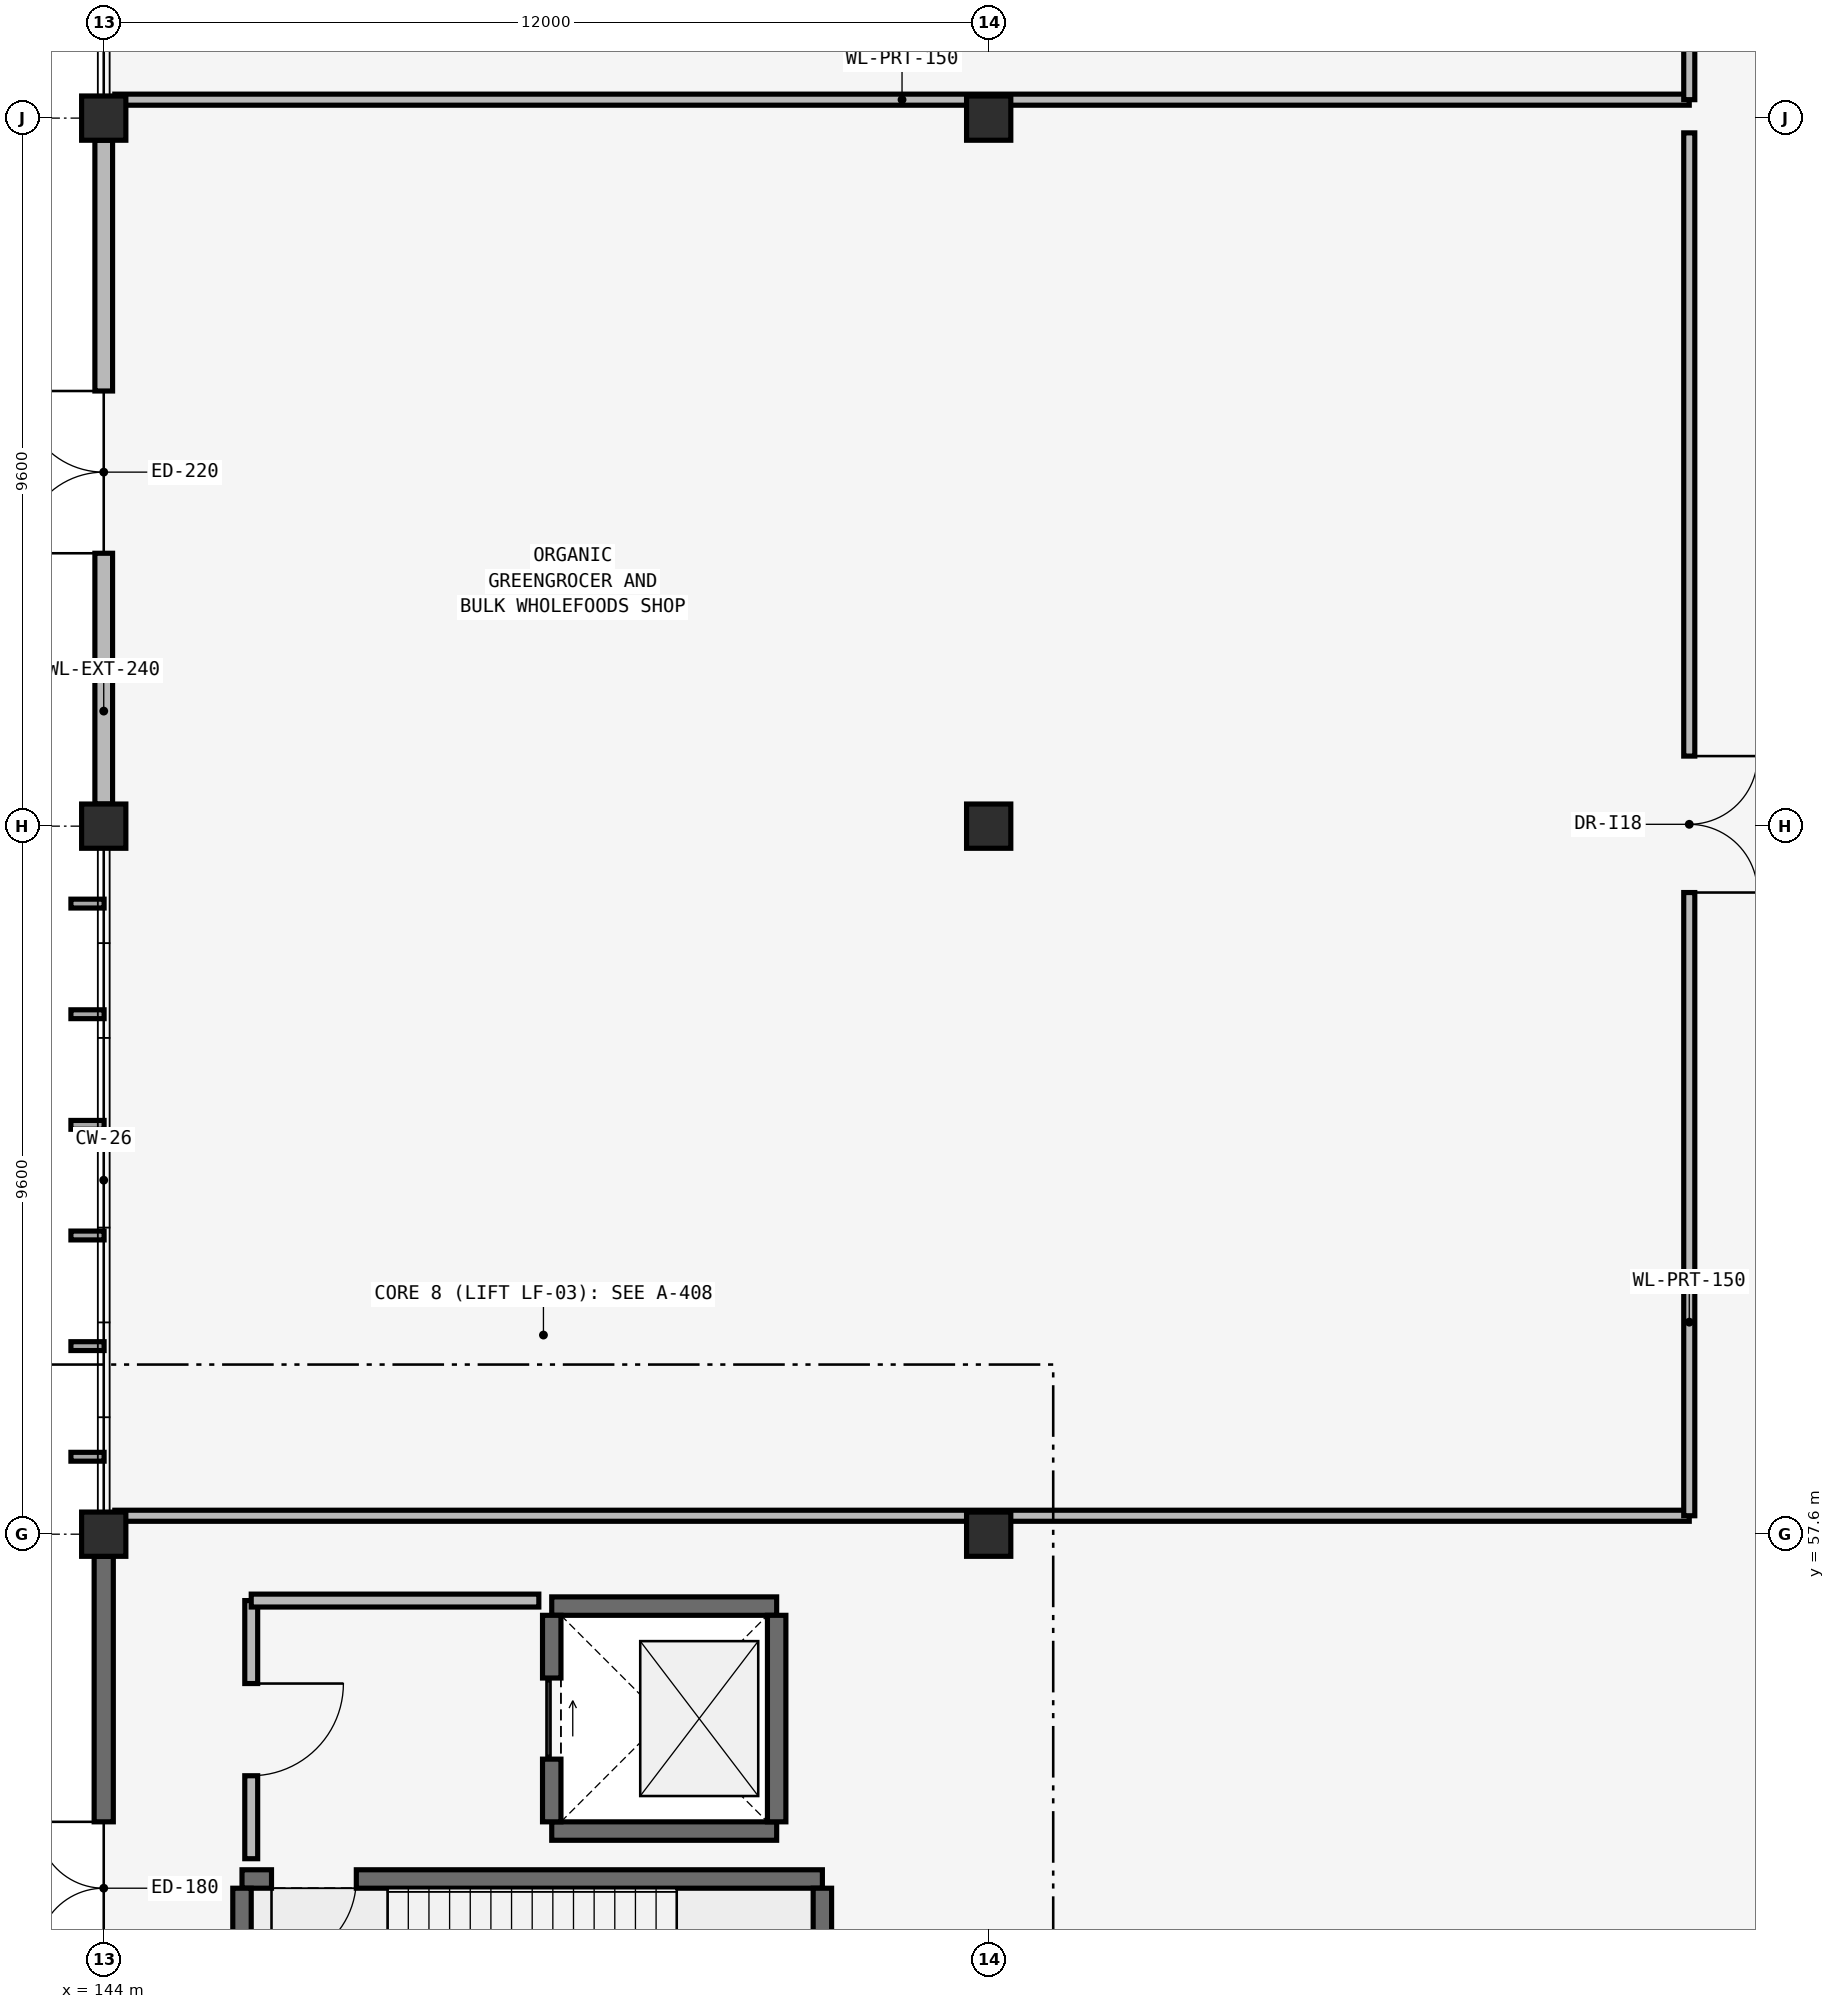
"""IFC4 building model, lengths in metres.
Left out: names, types, materials, properties, quantities, classifications, styles, units other than length and angle.
Written with IfcOpenShell. Run it as: python <this file> out.ifc"""

import sys

from ifc_helpers import new_model, si_unit, direction, frame, frame_2d, origin, origin_2d, place, context, subcontext, project, spatial, rectangle, extrude, element, fill, save


model = new_model("IFC4")
c1 = context("Model", 3, precision=1e-05, world=origin(), true_north=direction((0.0, 1.0)))
c2 = subcontext(c1, "Body", "Model", "MODEL_VIEW")
j1 = project(units=[si_unit("LENGTHUNIT", "METRE"), si_unit("PLANEANGLEUNIT", "RADIAN")], contexts=[c1])
p1 = place(None, origin())
s1 = spatial("IfcSite", under=j1, at=p1, CompositionType="ELEMENT")
p2 = place(p1, origin())
s2 = spatial("IfcBuilding", under=s1, at=p2, CompositionType="ELEMENT")
p3 = place(p2, origin())
s3 = spatial("IfcBuildingStorey", under=s2, at=p3, CompositionType="ELEMENT", Elevation=0.0)
for number, where, z_axis, x_axis in (
    (1, (144.0, 57.6, 0.0), (0.0, 0.0, 1.0), (1.0, 0.0, 0.0)),
    (2, (144.0, 67.2, 0.0), (0.0, 0.0, 1.0), (1.0, 0.0, 0.0)),
    (3, (144.0, 76.8, 0.0), (0.0, 0.0, 1.0), (1.0, 0.0, 0.0)),
    (4, (156.0, 57.6, 0.0), (0.0, 0.0, 1.0), (1.0, 0.0, 0.0)),
    (5, (156.0, 67.2, 0.0), (0.0, 0.0, 1.0), (1.0, 0.0, 0.0)),
    (6, (156.0, 76.8, 0.0), (0.0, 0.0, 1.0), (1.0, 0.0, 0.0)),
):
    element("IfcColumn", number, at=place(p3, frame(where, z_axis=z_axis, x_axis=x_axis)), inside=s3, PredefinedType="COLUMN", context=c2, shape_type="SweptSolid", body=[
        extrude(rectangle(XDim=0.6, YDim=0.6, at=origin_2d()), origin(), (0.0, 0.0, 1.0), 5.4),
    ])
p4 = place(p3, frame((144.0, 48.3, 0.0), z_axis=(0.0, 0.0, 1.0), x_axis=(0.0, 1.0, 0.0)))
e7 = element("IfcWall", 7, at=p4, inside=s3, PredefinedType="SOLIDWALL", context=c2, shape_type="SweptSolid", body=[
    extrude(rectangle(XDim=9.0, YDim=0.26, at=frame_2d((4.5, 0.0))), origin(), (0.0, 0.0, 1.0), 5.1),
])
p5 = place(p4, frame((3.6, 0.0, 0.0)))
e8 = element("IfcOpeningElement", 8, at=p5, cuts=e7, PredefinedType="OPENING", context=c2, shape_type="SweptSolid", body=[
    extrude(rectangle(XDim=1.8, YDim=2.3, at=frame_2d((0.9, 1.15))), frame((0.0, 0.145, 0.0), z_axis=(0.0, -1.0, 0.0), x_axis=(1.0, 0.0, 0.0)), (0.0, 0.0, 1.0), 0.29),
])
p6 = place(p3, frame((144.0, 67.5, 0.0), z_axis=(0.0, 0.0, 1.0), x_axis=(0.0, 1.0, 0.0)))
e9 = element("IfcWall", 9, at=p6, inside=s3, PredefinedType="SOLIDWALL", context=c2, shape_type="SweptSolid", body=[
    extrude(rectangle(XDim=9.0, YDim=0.24, at=frame_2d((4.5, 0.0))), origin(), (0.0, 0.0, 1.0), 4.321),
])
p7 = place(p6, frame((3.4, 0.0, 0.0)))
e10 = element("IfcOpeningElement", 10, at=p7, cuts=e9, PredefinedType="OPENING", context=c2, shape_type="SweptSolid", body=[
    extrude(rectangle(XDim=2.2, YDim=2.4, at=frame_2d((1.1, 1.2))), frame((0.0, 0.135, 0.0), z_axis=(0.0, -1.0, 0.0), x_axis=(1.0, 0.0, 0.0)), (0.0, 0.0, 1.0), 0.27),
])
p8 = place(p3, frame((145.875, 52.925, 0.0), z_axis=(0.0, 0.0, 1.0), x_axis=(1.0, 0.0, 0.0)))
e11 = element("IfcWall", 11, at=p8, inside=s3, PredefinedType="SHEAR", context=c2, shape_type="SweptSolid", body=[
    extrude(rectangle(XDim=7.87, YDim=0.25, at=frame_2d((3.935, 0.0))), origin(), (0.0, 0.0, 1.0), 5.08),
])
p9 = place(p8, frame((0.4, 0.0, 0.0)))
e12 = element("IfcOpeningElement", 12, at=p9, cuts=e11, PredefinedType="OPENING", context=c2, shape_type="SweptSolid", body=[
    extrude(rectangle(XDim=1.15, YDim=2.15, at=frame_2d((0.575, 1.075))), frame((0.0, 0.14, 0.0), z_axis=(0.0, -1.0, 0.0), x_axis=(1.0, 0.0, 0.0)), (0.0, 0.0, 1.0), 0.28),
])
for number, where, z_axis, x_axis in (
    (13, (145.875, 48.9, 0.0), (0.0, 0.0, 1.0), (0.0, 1.0, 0.0)),
    (14, (153.745, 48.9, 0.0), (0.0, 0.0, 1.0), (0.0, 1.0, 0.0)),
):
    element("IfcWall", number, at=place(p3, frame(where, z_axis=z_axis, x_axis=x_axis)), inside=s3, PredefinedType="SHEAR", context=c2, shape_type="SweptSolid", body=[
        extrude(rectangle(XDim=3.9, YDim=0.25, at=frame_2d((1.95, 0.0))), origin(), (0.0, 0.0, 1.0), 5.08),
    ])
for number, where, z_axis, x_axis in (
    (15, (150.075, 53.575, 0.0), (0.0, 0.0, 1.0), (1.0, 0.0, 0.0)),
    (16, (150.075, 56.625, 0.0), (0.0, 0.0, 1.0), (1.0, 0.0, 0.0)),
):
    element("IfcWall", number, at=place(p3, frame(where, z_axis=z_axis, x_axis=x_axis)), inside=s3, PredefinedType="SHEAR", context=c2, shape_type="SweptSolid", body=[
        extrude(rectangle(XDim=3.05, YDim=0.25, at=frame_2d((1.525, 0.0))), origin(), (0.0, 0.0, 1.0), 5.08),
    ])
p10 = place(p3, frame((153.125, 53.7, 0.0), z_axis=(0.0, 0.0, 1.0), x_axis=(0.0, 1.0, 0.0)))
e17 = element("IfcWall", 17, at=p10, inside=s3, PredefinedType="SHEAR", context=c2, shape_type="SweptSolid", body=[
    extrude(rectangle(XDim=2.8, YDim=0.25, at=frame_2d((1.4, 0.0))), origin(), (0.0, 0.0, 1.0), 5.08),
])
p11 = place(p3, frame((150.075, 53.7, 0.0), z_axis=(0.0, 0.0, 1.0), x_axis=(0.0, 1.0, 0.0)))
e18 = element("IfcWall", 18, at=p11, inside=s3, PredefinedType="SHEAR", context=c2, shape_type="SweptSolid", body=[
    extrude(rectangle(XDim=2.8, YDim=0.25, at=frame_2d((1.4, 0.0))), origin(), (0.0, 0.0, 1.0), 5.08),
])
p12 = place(p11, frame((0.85, 0.0, 0.0)))
e19 = element("IfcOpeningElement", 19, at=p12, cuts=e18, PredefinedType="OPENING", context=c2, shape_type="SweptSolid", body=[
    extrude(rectangle(XDim=1.1, YDim=2.15, at=frame_2d((0.55, 1.075))), frame((0.0, 0.14, 0.0), z_axis=(0.0, -1.0, 0.0), x_axis=(1.0, 0.0, 0.0)), (0.0, 0.0, 1.0), 0.28),
])
p13 = place(p3, frame((146.0, 53.2, 0.0), z_axis=(0.0, 0.0, 1.0), x_axis=(0.0, 1.0, 0.0)))
e20 = element("IfcWall", 20, at=p13, inside=s3, PredefinedType="PARTITIONING", context=c2, shape_type="SweptSolid", body=[
    extrude(rectangle(XDim=3.5, YDim=0.175, at=frame_2d((1.75, 0.0))), origin(), (0.0, 0.0, 1.0), 5.08),
])
p14 = place(p13, frame((1.125, 0.0, 0.0)))
e21 = element("IfcOpeningElement", 21, at=p14, cuts=e20, PredefinedType="OPENING", context=c2, shape_type="SweptSolid", body=[
    extrude(rectangle(XDim=1.25, YDim=2.2, at=frame_2d((0.625, 1.1))), frame((0.0, 0.103, 0.0), z_axis=(0.0, -1.0, 0.0), x_axis=(1.0, 0.0, 0.0)), (0.0, 0.0, 1.0), 0.205),
])
p15 = place(p3, frame((146.0, 56.7, 0.0), z_axis=(0.0, 0.0, 1.0), x_axis=(1.0, 0.0, 0.0)))
e22 = element("IfcWall", 22, at=p15, inside=s3, PredefinedType="PARTITIONING", context=c2, shape_type="SweptSolid", body=[
    extrude(rectangle(XDim=3.9, YDim=0.175, at=frame_2d((1.95, 0.0))), origin(), (0.0, 0.0, 1.0), 5.08),
])
p16 = place(p3, frame((144.15, 57.85, 0.0), z_axis=(0.0, 0.0, 1.0), x_axis=(1.0, 0.0, 0.0)))
e23 = element("IfcWall", 23, at=p16, inside=s3, PredefinedType="PARTITIONING", context=c2, shape_type="SweptSolid", body=[
    extrude(rectangle(XDim=21.35, YDim=0.15, at=frame_2d((10.675, 0.0))), origin(), (0.0, 0.0, 1.0), 5.08),
])
p17 = place(p3, frame((165.5, 57.85, 0.0), z_axis=(0.0, 0.0, 1.0), x_axis=(0.0, 1.0, 0.0)))
e24 = element("IfcWall", 24, at=p17, inside=s3, PredefinedType="PARTITIONING", context=c2, shape_type="SweptSolid", body=[
    extrude(rectangle(XDim=18.75, YDim=0.15, at=frame_2d((9.375, 0.0))), origin(), (0.0, 0.0, 1.0), 5.08),
])
p18 = place(p17, frame((8.45, 0.0, 0.0)))
e25 = element("IfcOpeningElement", 25, at=p18, cuts=e24, PredefinedType="OPENING", context=c2, shape_type="SweptSolid", body=[
    extrude(rectangle(XDim=1.85, YDim=2.2, at=frame_2d((0.925, 1.1))), frame((0.0, 0.09, 0.0), z_axis=(0.0, -1.0, 0.0), x_axis=(1.0, 0.0, 0.0)), (0.0, 0.0, 1.0), 0.18),
])
p19 = place(p3, frame((144.15, 77.05, 0.0), z_axis=(0.0, 0.0, 1.0), x_axis=(1.0, 0.0, 0.0)))
e26 = element("IfcWall", 26, at=p19, inside=s3, PredefinedType="PARTITIONING", context=c2, shape_type="SweptSolid", body=[
    extrude(rectangle(XDim=21.35, YDim=0.15, at=frame_2d((10.675, 0.0))), origin(), (0.0, 0.0, 1.0), 5.08),
])
p20 = place(p3, frame((165.5, 77.05, 0.0), z_axis=(0.0, 0.0, 1.0), x_axis=(0.0, 1.0, 0.0)))
e27 = element("IfcWall", 27, at=p20, inside=s3, PredefinedType="PARTITIONING", context=c2, shape_type="SweptSolid", body=[
    extrude(rectangle(XDim=18.8, YDim=0.15, at=frame_2d((9.4, 0.0))), origin(), (0.0, 0.0, 1.0), 5.08),
])
p21 = place(p20, frame((8.475, 0.0, 0.0)))
e28 = element("IfcOpeningElement", 28, at=p21, cuts=e27, PredefinedType="OPENING", context=c2, shape_type="SweptSolid", body=[
    extrude(rectangle(XDim=1.85, YDim=2.2, at=frame_2d((0.925, 1.1))), frame((0.0, 0.09, 0.0), z_axis=(0.0, -1.0, 0.0), x_axis=(1.0, 0.0, 0.0)), (0.0, 0.0, 1.0), 0.18),
])
p22 = place(p5, origin())
e29 = element("IfcDoor", 29, at=p22, inside=s3, OperationType="DOUBLE_DOOR_SINGLE_SWING", PredefinedType="DOOR", context=c2, shape_type="SweptSolid", body=[
    extrude(rectangle(XDim=1.8, YDim=2.3, at=frame_2d((0.9, 1.15))), frame((0.0, 0.025, 0.0), z_axis=(0.0, -1.0, 0.0), x_axis=(1.0, 0.0, 0.0)), (0.0, 0.0, 1.0), 0.05),
])
fill(e8, e29)
p23 = place(p7, origin())
e30 = element("IfcDoor", 30, at=p23, inside=s3, OperationType="DOUBLE_DOOR_SINGLE_SWING", PredefinedType="DOOR", context=c2, shape_type="SweptSolid", body=[
    extrude(rectangle(XDim=2.2, YDim=2.4, at=frame_2d((1.1, 1.2))), frame((0.0, 0.025, 0.0), z_axis=(0.0, -1.0, 0.0), x_axis=(1.0, 0.0, 0.0)), (0.0, 0.0, 1.0), 0.05),
])
fill(e10, e30)
p24 = place(p9, origin())
e31 = element("IfcDoor", 31, at=p24, inside=s3, OperationType="SINGLE_SWING_LEFT", PredefinedType="DOOR", context=c2, shape_type="SweptSolid", body=[
    extrude(rectangle(XDim=1.15, YDim=2.15, at=frame_2d((0.575, 1.075))), frame((0.0, 0.025, 0.0), z_axis=(0.0, -1.0, 0.0), x_axis=(1.0, 0.0, 0.0)), (0.0, 0.0, 1.0), 0.05),
])
fill(e12, e31)
p25 = place(p12, origin())
e32 = element("IfcDoor", 32, at=p25, inside=s3, OperationType="SLIDING_TO_LEFT", PredefinedType="DOOR", context=c2, shape_type="SweptSolid", body=[
    extrude(rectangle(XDim=1.1, YDim=2.15, at=frame_2d((0.55, 1.075))), frame((0.0, 0.025, 0.0), z_axis=(0.0, -1.0, 0.0), x_axis=(1.0, 0.0, 0.0)), (0.0, 0.0, 1.0), 0.05),
])
fill(e19, e32)
p26 = place(p14, frame((1.25, 0.0, 0.0), z_axis=(0.0, 0.0, 1.0), x_axis=(-1.0, 0.0, 0.0)))
e33 = element("IfcDoor", 33, at=p26, inside=s3, OperationType="SINGLE_SWING_RIGHT", PredefinedType="DOOR", context=c2, shape_type="SweptSolid", body=[
    extrude(rectangle(XDim=1.25, YDim=2.2, at=frame_2d((0.625, 1.1))), frame((0.0, 0.025, 0.0), z_axis=(0.0, -1.0, 0.0), x_axis=(1.0, 0.0, 0.0)), (0.0, 0.0, 1.0), 0.05),
])
fill(e21, e33)
p27 = place(p18, origin())
e34 = element("IfcDoor", 34, at=p27, inside=s3, OperationType="DOUBLE_DOOR_SINGLE_SWING", PredefinedType="DOOR", context=c2, shape_type="SweptSolid", body=[
    extrude(rectangle(XDim=1.85, YDim=2.2, at=frame_2d((0.925, 1.1))), frame((0.0, 0.025, 0.0), z_axis=(0.0, -1.0, 0.0), x_axis=(1.0, 0.0, 0.0)), (0.0, 0.0, 1.0), 0.05),
])
fill(e25, e34)
save(model, sys.argv[1])
